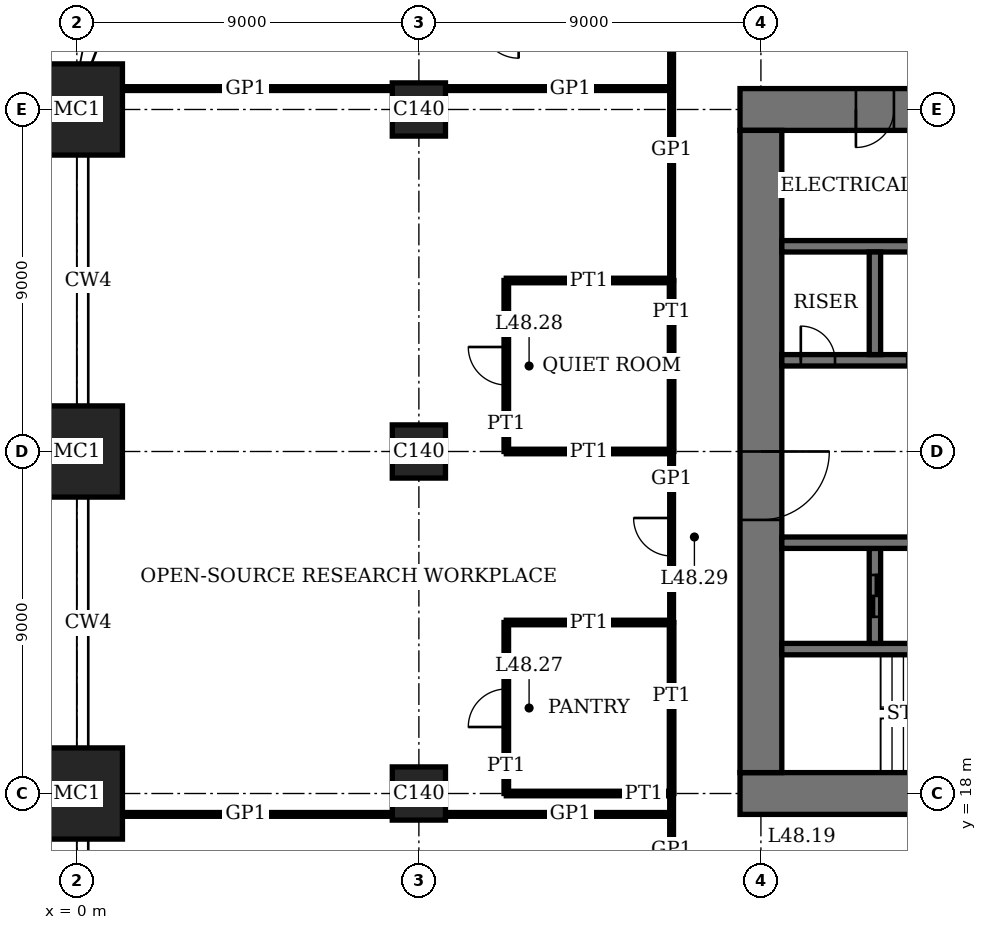
"""IFC4 building model, lengths in metres.
Left out: names, types, materials, properties, quantities, classifications, styles, units other than length and angle.
Written with IfcOpenShell. Run it as: python <this file> out.ifc"""

import sys

from ifc_helpers import new_model, si_unit, direction, frame, frame_2d, origin, origin_2d, place, context, subcontext, project, spatial, rectangle, extrude, element, fill, save


model = new_model("IFC4")
c1 = context("Model", 3, precision=1e-05, world=origin(), true_north=direction((0.0, 1.0)))
c2 = subcontext(c1, "Body", "Model", "MODEL_VIEW")
j1 = project(units=[si_unit("LENGTHUNIT", "METRE"), si_unit("PLANEANGLEUNIT", "RADIAN")], contexts=[c1])
p1 = place(None, origin())
s1 = spatial("IfcSite", under=j1, at=p1, CompositionType="ELEMENT")
p2 = place(p1, origin())
s2 = spatial("IfcBuilding", under=s1, at=p2, CompositionType="ELEMENT")
p3 = place(p2, frame((0.0, 0.0, 198.2)))
s3 = spatial("IfcBuildingStorey", under=s2, at=p3, CompositionType="ELEMENT", Elevation=198.2)
for number, where, z_axis, x_axis in (
    (1, (0.0, 18.0, 0.0), (0.0, 0.0, 1.0), (1.0, 0.0, 0.0)),
    (2, (0.0, 27.0, 0.0), (0.0, 0.0, 1.0), (1.0, 0.0, 0.0)),
    (3, (0.0, 36.0, 0.0), (0.0, 0.0, 1.0), (1.0, 0.0, 0.0)),
):
    element("IfcColumn", number, at=place(p3, frame(where, z_axis=z_axis, x_axis=x_axis)), inside=s3, PredefinedType="COLUMN", context=c2, shape_type="SweptSolid", body=[
        extrude(rectangle(XDim=2.4, YDim=2.4, at=origin_2d()), origin(), (0.0, 0.0, 1.0), 4.0),
    ])
for number, where, z_axis, x_axis in (
    (4, (9.0, 18.0, 0.0), (0.0, 0.0, 1.0), (1.0, 0.0, 0.0)),
    (5, (9.0, 27.0, 0.0), (0.0, 0.0, 1.0), (1.0, 0.0, 0.0)),
    (6, (9.0, 36.0, 0.0), (0.0, 0.0, 1.0), (1.0, 0.0, 0.0)),
):
    element("IfcColumn", number, at=place(p3, frame(where, z_axis=z_axis, x_axis=x_axis)), inside=s3, PredefinedType="COLUMN", context=c2, shape_type="SweptSolid", body=[
        extrude(rectangle(XDim=1.4, YDim=1.4, at=origin_2d()), origin(), (0.0, 0.0, 1.0), 4.0),
    ])
p4 = place(p3, frame((17.45, 18.0, 0.0), z_axis=(0.0, 0.0, 1.0), x_axis=(1.0, 0.0, 0.0)))
e7 = element("IfcWall", 7, at=p4, inside=s3, PredefinedType="SHEAR", context=c2, shape_type="SweptSolid", body=[
    extrude(rectangle(XDim=28.1, YDim=1.1, at=frame_2d((14.05, 0.0))), origin(), (0.0, 0.0, 1.0), 4.0),
])
p5 = place(p4, frame((11.55, 0.0, 0.0)))
e8 = element("IfcOpeningElement", 8, at=p5, cuts=e7, PredefinedType="OPENING", context=c2, shape_type="SweptSolid", body=[
    extrude(rectangle(XDim=1.0, YDim=2.4, at=frame_2d((0.5, 1.2))), frame((0.0, 0.56, 0.0), z_axis=(0.0, -1.0, 0.0), x_axis=(1.0, 0.0, 0.0)), (0.0, 0.0, 1.0), 1.12),
])
p6 = place(p4, frame((16.55, 0.0, 0.0)))
e9 = element("IfcOpeningElement", 9, at=p6, cuts=e7, PredefinedType="OPENING", context=c2, shape_type="SweptSolid", body=[
    extrude(rectangle(XDim=1.0, YDim=2.4, at=frame_2d((0.5, 1.2))), frame((0.0, 0.56, 0.0), z_axis=(0.0, -1.0, 0.0), x_axis=(1.0, 0.0, 0.0)), (0.0, 0.0, 1.0), 1.12),
])
p7 = place(p4, frame((20.0, 0.0, 0.0)))
e10 = element("IfcOpeningElement", 10, at=p7, cuts=e7, PredefinedType="OPENING", context=c2, shape_type="SweptSolid", body=[
    extrude(rectangle(XDim=1.1, YDim=2.4, at=frame_2d((0.55, 1.2))), frame((0.0, 0.56, 0.0), z_axis=(0.0, -1.0, 0.0), x_axis=(1.0, 0.0, 0.0)), (0.0, 0.0, 1.0), 1.12),
])
p8 = place(p4, frame((24.05, 0.0, 0.0)))
e11 = element("IfcOpeningElement", 11, at=p8, cuts=e7, PredefinedType="OPENING", context=c2, shape_type="SweptSolid", body=[
    extrude(rectangle(XDim=1.0, YDim=2.4, at=frame_2d((0.5, 1.2))), frame((0.0, 0.56, 0.0), z_axis=(0.0, -1.0, 0.0), x_axis=(1.0, 0.0, 0.0)), (0.0, 0.0, 1.0), 1.12),
])
p9 = place(p3, frame((45.55, 36.0, 0.0), z_axis=(0.0, 0.0, 1.0), x_axis=(-1.0, 0.0, 0.0)))
e12 = element("IfcWall", 12, at=p9, inside=s3, PredefinedType="SHEAR", context=c2, shape_type="SweptSolid", body=[
    extrude(rectangle(XDim=28.1, YDim=1.1, at=frame_2d((14.05, 0.0))), origin(), (0.0, 0.0, 1.0), 4.0),
])
p10 = place(p9, frame((11.55, 0.0, 0.0)))
e13 = element("IfcOpeningElement", 13, at=p10, cuts=e12, PredefinedType="OPENING", context=c2, shape_type="SweptSolid", body=[
    extrude(rectangle(XDim=1.0, YDim=2.4, at=frame_2d((0.5, 1.2))), frame((0.0, 0.56, 0.0), z_axis=(0.0, -1.0, 0.0), x_axis=(1.0, 0.0, 0.0)), (0.0, 0.0, 1.0), 1.12),
])
p11 = place(p9, frame((16.55, 0.0, 0.0)))
e14 = element("IfcOpeningElement", 14, at=p11, cuts=e12, PredefinedType="OPENING", context=c2, shape_type="SweptSolid", body=[
    extrude(rectangle(XDim=1.0, YDim=2.4, at=frame_2d((0.5, 1.2))), frame((0.0, 0.56, 0.0), z_axis=(0.0, -1.0, 0.0), x_axis=(1.0, 0.0, 0.0)), (0.0, 0.0, 1.0), 1.12),
])
p12 = place(p9, frame((20.0, 0.0, 0.0)))
e15 = element("IfcOpeningElement", 15, at=p12, cuts=e12, PredefinedType="OPENING", context=c2, shape_type="SweptSolid", body=[
    extrude(rectangle(XDim=1.1, YDim=2.4, at=frame_2d((0.55, 1.2))), frame((0.0, 0.56, 0.0), z_axis=(0.0, -1.0, 0.0), x_axis=(1.0, 0.0, 0.0)), (0.0, 0.0, 1.0), 1.12),
])
p13 = place(p9, frame((24.05, 0.0, 0.0)))
e16 = element("IfcOpeningElement", 16, at=p13, cuts=e12, PredefinedType="OPENING", context=c2, shape_type="SweptSolid", body=[
    extrude(rectangle(XDim=1.0, YDim=2.4, at=frame_2d((0.5, 1.2))), frame((0.0, 0.56, 0.0), z_axis=(0.0, -1.0, 0.0), x_axis=(1.0, 0.0, 0.0)), (0.0, 0.0, 1.0), 1.12),
])
p14 = place(p3, frame((18.0, 35.45, 0.0), z_axis=(0.0, 0.0, 1.0), x_axis=(0.0, -1.0, 0.0)))
e17 = element("IfcWall", 17, at=p14, inside=s3, PredefinedType="SHEAR", context=c2, shape_type="SweptSolid", body=[
    extrude(rectangle(XDim=16.9, YDim=1.1, at=frame_2d((8.45, 0.0))), origin(), (0.0, 0.0, 1.0), 4.0),
])
p15 = place(p14, frame((8.45, 0.0, 0.0)))
e18 = element("IfcOpeningElement", 18, at=p15, cuts=e17, PredefinedType="OPENING", context=c2, shape_type="SweptSolid", body=[
    extrude(rectangle(XDim=1.8, YDim=2.4, at=frame_2d((0.9, 1.2))), frame((0.0, 0.56, 0.0), z_axis=(0.0, -1.0, 0.0), x_axis=(1.0, 0.0, 0.0)), (0.0, 0.0, 1.0), 1.12),
])
p16 = place(p3, frame((18.55, 21.8, 0.0), z_axis=(0.0, 0.0, 1.0), x_axis=(1.0, 0.0, 0.0)))
e19 = element("IfcWall", 19, at=p16, inside=s3, PredefinedType="SHEAR", context=c2, shape_type="SweptSolid", body=[
    extrude(rectangle(XDim=8.3, YDim=0.3, at=frame_2d((4.15, 0.0))), origin(), (0.0, 0.0, 1.0), 4.0),
])
p17 = place(p16, frame((6.85, 0.0, 0.0)))
e20 = element("IfcOpeningElement", 20, at=p17, cuts=e19, PredefinedType="OPENING", context=c2, shape_type="SweptSolid", body=[
    extrude(rectangle(XDim=1.0, YDim=2.4, at=frame_2d((0.5, 1.2))), frame((0.0, 0.16, 0.0), z_axis=(0.0, -1.0, 0.0), x_axis=(1.0, 0.0, 0.0)), (0.0, 0.0, 1.0), 0.32),
])
p18 = place(p3, frame((21.0, 21.95, 0.0), z_axis=(0.0, 0.0, 1.0), x_axis=(0.0, 1.0, 0.0)))
e21 = element("IfcWall", 21, at=p18, inside=s3, PredefinedType="SHEAR", context=c2, shape_type="SweptSolid", body=[
    extrude(rectangle(XDim=2.5, YDim=0.3, at=frame_2d((1.25, 0.0))), origin(), (0.0, 0.0, 1.0), 4.0),
])
p19 = place(p18, frame((0.7, 0.0, 0.0)))
e22 = element("IfcOpeningElement", 22, at=p19, cuts=e21, PredefinedType="OPENING", context=c2, shape_type="SweptSolid", body=[
    extrude(rectangle(XDim=1.1, YDim=2.4, at=frame_2d((0.55, 1.2))), frame((0.0, 0.16, 0.0), z_axis=(0.0, -1.0, 0.0), x_axis=(1.0, 0.0, 0.0)), (0.0, 0.0, 1.0), 0.32),
])
p20 = place(p3, frame((18.55, 24.6, 0.0), z_axis=(0.0, 0.0, 1.0), x_axis=(1.0, 0.0, 0.0)))
e23 = element("IfcWall", 23, at=p20, inside=s3, PredefinedType="SHEAR", context=c2, shape_type="SweptSolid", body=[
    extrude(rectangle(XDim=25.9, YDim=0.3, at=frame_2d((12.95, 0.0))), origin(), (0.0, 0.0, 1.0), 4.0),
])
p21 = place(p20, frame((4.95, 0.0, 0.0)))
e24 = element("IfcOpeningElement", 24, at=p21, cuts=e23, PredefinedType="OPENING", context=c2, shape_type="SweptSolid", body=[
    extrude(rectangle(XDim=1.0, YDim=2.4, at=frame_2d((0.5, 1.2))), frame((0.0, 0.16, 0.0), z_axis=(0.0, -1.0, 0.0), x_axis=(1.0, 0.0, 0.0)), (0.0, 0.0, 1.0), 0.32),
])
p22 = place(p20, frame((24.5, 0.0, 0.0)))
e25 = element("IfcOpeningElement", 25, at=p22, cuts=e23, PredefinedType="OPENING", context=c2, shape_type="SweptSolid", body=[
    extrude(rectangle(XDim=0.9, YDim=2.1, at=frame_2d((0.45, 1.05))), frame((0.0, 0.16, 0.0), z_axis=(0.0, -1.0, 0.0), x_axis=(1.0, 0.0, 0.0)), (0.0, 0.0, 1.0), 0.32),
])
p23 = place(p20, frame((21.3, 0.0, 0.0)))
e26 = element("IfcOpeningElement", 26, at=p23, cuts=e23, PredefinedType="OPENING", context=c2, shape_type="SweptSolid", body=[
    extrude(rectangle(XDim=1.3, YDim=2.4, at=frame_2d((0.65, 1.2))), frame((0.0, 0.16, 0.0), z_axis=(0.0, -1.0, 0.0), x_axis=(1.0, 0.0, 0.0)), (0.0, 0.0, 1.0), 0.32),
])
p24 = place(p3, frame((18.55, 29.4, 0.0), z_axis=(0.0, 0.0, 1.0), x_axis=(1.0, 0.0, 0.0)))
e27 = element("IfcWall", 27, at=p24, inside=s3, PredefinedType="SHEAR", context=c2, shape_type="SweptSolid", body=[
    extrude(rectangle(XDim=25.9, YDim=0.3, at=frame_2d((12.95, 0.0))), origin(), (0.0, 0.0, 1.0), 4.0),
])
p25 = place(p24, frame((19.95, 0.0, 0.0)))
e28 = element("IfcOpeningElement", 28, at=p25, cuts=e27, PredefinedType="OPENING", context=c2, shape_type="SweptSolid", body=[
    extrude(rectangle(XDim=1.0, YDim=2.4, at=frame_2d((0.5, 1.2))), frame((0.0, 0.16, 0.0), z_axis=(0.0, -1.0, 0.0), x_axis=(1.0, 0.0, 0.0)), (0.0, 0.0, 1.0), 0.32),
])
p26 = place(p24, frame((0.5, 0.0, 0.0)))
e29 = element("IfcOpeningElement", 29, at=p26, cuts=e27, PredefinedType="OPENING", context=c2, shape_type="SweptSolid", body=[
    extrude(rectangle(XDim=0.9, YDim=2.1, at=frame_2d((0.45, 1.05))), frame((0.0, 0.16, 0.0), z_axis=(0.0, -1.0, 0.0), x_axis=(1.0, 0.0, 0.0)), (0.0, 0.0, 1.0), 0.32),
])
p27 = place(p24, frame((15.45, 0.0, 0.0)))
e30 = element("IfcOpeningElement", 30, at=p27, cuts=e27, PredefinedType="OPENING", context=c2, shape_type="SweptSolid", body=[
    extrude(rectangle(XDim=1.0, YDim=2.4, at=frame_2d((0.5, 1.2))), frame((0.0, 0.16, 0.0), z_axis=(0.0, -1.0, 0.0), x_axis=(1.0, 0.0, 0.0)), (0.0, 0.0, 1.0), 0.32),
])
p28 = place(p24, frame((12.45, 0.0, 0.0)))
e31 = element("IfcOpeningElement", 31, at=p28, cuts=e27, PredefinedType="OPENING", context=c2, shape_type="SweptSolid", body=[
    extrude(rectangle(XDim=1.0, YDim=2.4, at=frame_2d((0.5, 1.2))), frame((0.0, 0.16, 0.0), z_axis=(0.0, -1.0, 0.0), x_axis=(1.0, 0.0, 0.0)), (0.0, 0.0, 1.0), 0.32),
])
p29 = place(p24, frame((9.4, 0.0, 0.0)))
e32 = element("IfcOpeningElement", 32, at=p29, cuts=e27, PredefinedType="OPENING", context=c2, shape_type="SweptSolid", body=[
    extrude(rectangle(XDim=1.1, YDim=2.4, at=frame_2d((0.55, 1.2))), frame((0.0, 0.16, 0.0), z_axis=(0.0, -1.0, 0.0), x_axis=(1.0, 0.0, 0.0)), (0.0, 0.0, 1.0), 0.32),
])
p30 = place(p24, frame((6.4, 0.0, 0.0)))
e33 = element("IfcOpeningElement", 33, at=p30, cuts=e27, PredefinedType="OPENING", context=c2, shape_type="SweptSolid", body=[
    extrude(rectangle(XDim=1.1, YDim=2.4, at=frame_2d((0.55, 1.2))), frame((0.0, 0.16, 0.0), z_axis=(0.0, -1.0, 0.0), x_axis=(1.0, 0.0, 0.0)), (0.0, 0.0, 1.0), 0.32),
])
p31 = place(p24, frame((3.3, 0.0, 0.0)))
e34 = element("IfcOpeningElement", 34, at=p31, cuts=e27, PredefinedType="OPENING", context=c2, shape_type="SweptSolid", body=[
    extrude(rectangle(XDim=1.3, YDim=2.4, at=frame_2d((0.65, 1.2))), frame((0.0, 0.16, 0.0), z_axis=(0.0, -1.0, 0.0), x_axis=(1.0, 0.0, 0.0)), (0.0, 0.0, 1.0), 0.32),
])
p32 = place(p3, frame((18.55, 32.4, 0.0), z_axis=(0.0, 0.0, 1.0), x_axis=(1.0, 0.0, 0.0)))
e35 = element("IfcWall", 35, at=p32, inside=s3, PredefinedType="SHEAR", context=c2, shape_type="SweptSolid", body=[
    extrude(rectangle(XDim=17.3, YDim=0.3, at=frame_2d((8.65, 0.0))), origin(), (0.0, 0.0, 1.0), 4.0),
])
p33 = place(p3, frame((21.0, 29.55, 0.0), z_axis=(0.0, 0.0, 1.0), x_axis=(0.0, 1.0, 0.0)))
e36 = element("IfcWall", 36, at=p33, inside=s3, PredefinedType="SHEAR", context=c2, shape_type="SweptSolid", body=[
    extrude(rectangle(XDim=2.7, YDim=0.3, at=frame_2d((1.35, 0.0))), origin(), (0.0, 0.0, 1.0), 4.0),
])
p34 = place(p3, frame((1.2, 17.45, 0.0), z_axis=(0.0, 0.0, 1.0), x_axis=(1.0, 0.0, 0.0)))
e37 = element("IfcWall", 37, at=p34, inside=s3, PredefinedType="PARTITIONING", context=c2, shape_type="SweptSolid", body=[
    extrude(rectangle(XDim=7.1, YDim=0.1, at=frame_2d((3.55, 0.0))), origin(), (0.0, 0.0, 1.0), 3.75),
])
p35 = place(p3, frame((9.7, 17.45, 0.0), z_axis=(0.0, 0.0, 1.0), x_axis=(1.0, 0.0, 0.0)))
e38 = element("IfcWall", 38, at=p35, inside=s3, PredefinedType="PARTITIONING", context=c2, shape_type="SweptSolid", body=[
    extrude(rectangle(XDim=5.95, YDim=0.1, at=frame_2d((2.975, 0.0))), origin(), (0.0, 0.0, 1.0), 3.75),
])
p36 = place(p3, frame((11.3, 18.0, 0.0), z_axis=(0.0, 0.0, 1.0), x_axis=(1.0, 0.0, 0.0)))
e39 = element("IfcWall", 39, at=p36, inside=s3, PredefinedType="PARTITIONING", context=c2, shape_type="SweptSolid", body=[
    extrude(rectangle(XDim=4.35, YDim=0.12, at=frame_2d((2.175, 0.0))), origin(), (0.0, 0.0, 1.0), 3.05),
])
p37 = place(p3, frame((11.3, 22.5, 0.0), z_axis=(0.0, 0.0, 1.0), x_axis=(1.0, 0.0, 0.0)))
e40 = element("IfcWall", 40, at=p37, inside=s3, PredefinedType="PARTITIONING", context=c2, shape_type="SweptSolid", body=[
    extrude(rectangle(XDim=4.35, YDim=0.12, at=frame_2d((2.175, 0.0))), origin(), (0.0, 0.0, 1.0), 3.1),
])
p38 = place(p3, frame((11.3, 27.0, 0.0), z_axis=(0.0, 0.0, 1.0), x_axis=(1.0, 0.0, 0.0)))
e41 = element("IfcWall", 41, at=p38, inside=s3, PredefinedType="PARTITIONING", context=c2, shape_type="SweptSolid", body=[
    extrude(rectangle(XDim=4.35, YDim=0.12, at=frame_2d((2.175, 0.0))), origin(), (0.0, 0.0, 1.0), 3.05),
])
p39 = place(p3, frame((11.3, 31.5, 0.0), z_axis=(0.0, 0.0, 1.0), x_axis=(1.0, 0.0, 0.0)))
e42 = element("IfcWall", 42, at=p39, inside=s3, PredefinedType="PARTITIONING", context=c2, shape_type="SweptSolid", body=[
    extrude(rectangle(XDim=4.35, YDim=0.12, at=frame_2d((2.175, 0.0))), origin(), (0.0, 0.0, 1.0), 3.1),
])
p40 = place(p3, frame((1.2, 36.55, 0.0), z_axis=(0.0, 0.0, 1.0), x_axis=(1.0, 0.0, 0.0)))
e43 = element("IfcWall", 43, at=p40, inside=s3, PredefinedType="PARTITIONING", context=c2, shape_type="SweptSolid", body=[
    extrude(rectangle(XDim=7.1, YDim=0.1, at=frame_2d((3.55, 0.0))), origin(), (0.0, 0.0, 1.0), 3.75),
])
p41 = place(p3, frame((9.7, 36.55, 0.0), z_axis=(0.0, 0.0, 1.0), x_axis=(1.0, 0.0, 0.0)))
e44 = element("IfcWall", 44, at=p41, inside=s3, PredefinedType="PARTITIONING", context=c2, shape_type="SweptSolid", body=[
    extrude(rectangle(XDim=5.95, YDim=0.1, at=frame_2d((2.975, 0.0))), origin(), (0.0, 0.0, 1.0), 3.75),
])
p42 = place(p3, frame((11.3, 18.0, 0.0), z_axis=(0.0, 0.0, 1.0), x_axis=(0.0, 1.0, 0.0)))
e45 = element("IfcWall", 45, at=p42, inside=s3, PredefinedType="PARTITIONING", context=c2, shape_type="SweptSolid", body=[
    extrude(rectangle(XDim=4.5, YDim=0.12, at=frame_2d((2.25, 0.0))), origin(), (0.0, 0.0, 1.0), 3.75),
])
p43 = place(p42, frame((1.75, 0.0, 0.0)))
e46 = element("IfcOpeningElement", 46, at=p43, cuts=e45, PredefinedType="OPENING", context=c2, shape_type="SweptSolid", body=[
    extrude(rectangle(XDim=1.0, YDim=2.4, at=frame_2d((0.5, 1.2))), frame((0.0, 0.07, 0.0), z_axis=(0.0, -1.0, 0.0), x_axis=(1.0, 0.0, 0.0)), (0.0, 0.0, 1.0), 0.14),
])
p44 = place(p3, frame((11.3, 27.0, 0.0), z_axis=(0.0, 0.0, 1.0), x_axis=(0.0, 1.0, 0.0)))
e47 = element("IfcWall", 47, at=p44, inside=s3, PredefinedType="PARTITIONING", context=c2, shape_type="SweptSolid", body=[
    extrude(rectangle(XDim=4.5, YDim=0.12, at=frame_2d((2.25, 0.0))), origin(), (0.0, 0.0, 1.0), 3.75),
])
p45 = place(p44, frame((1.75, 0.0, 0.0)))
e48 = element("IfcOpeningElement", 48, at=p45, cuts=e47, PredefinedType="OPENING", context=c2, shape_type="SweptSolid", body=[
    extrude(rectangle(XDim=1.0, YDim=2.4, at=frame_2d((0.5, 1.2))), frame((0.0, 0.07, 0.0), z_axis=(0.0, -1.0, 0.0), x_axis=(1.0, 0.0, 0.0)), (0.0, 0.0, 1.0), 0.14),
])
for number, where, z_axis, x_axis in (
    (49, (15.65, 18.0, 0.0), (0.0, 0.0, 1.0), (0.0, 1.0, 0.0)),
    (50, (15.65, 27.0, 0.0), (0.0, 0.0, 1.0), (0.0, 1.0, 0.0)),
):
    element("IfcWall", number, at=place(p3, frame(where, z_axis=z_axis, x_axis=x_axis)), inside=s3, PredefinedType="PARTITIONING", context=c2, shape_type="SweptSolid", body=[
        extrude(rectangle(XDim=4.5, YDim=0.12, at=frame_2d((2.25, 0.0))), origin(), (0.0, 0.0, 1.0), 3.75),
    ])
p46 = place(p3, frame((15.65, 15.65, 0.0), z_axis=(0.0, 0.0, 1.0), x_axis=(0.0, 1.0, 0.0)))
e51 = element("IfcWall", 51, at=p46, inside=s3, PredefinedType="PARTITIONING", context=c2, shape_type="SweptSolid", body=[
    extrude(rectangle(XDim=2.35, YDim=0.1, at=frame_2d((1.175, 0.0))), origin(), (0.0, 0.0, 1.0), 3.75),
])
p47 = place(p3, frame((15.65, 22.5, 0.0), z_axis=(0.0, 0.0, 1.0), x_axis=(0.0, 1.0, 0.0)))
e52 = element("IfcWall", 52, at=p47, inside=s3, PredefinedType="PARTITIONING", context=c2, shape_type="SweptSolid", body=[
    extrude(rectangle(XDim=4.5, YDim=0.1, at=frame_2d((2.25, 0.0))), origin(), (0.0, 0.0, 1.0), 3.75),
])
p48 = place(p47, frame((1.75, 0.0, 0.0)))
e53 = element("IfcOpeningElement", 53, at=p48, cuts=e52, PredefinedType="OPENING", context=c2, shape_type="SweptSolid", body=[
    extrude(rectangle(XDim=1.0, YDim=2.4, at=frame_2d((0.5, 1.2))), frame((0.0, 0.06, 0.0), z_axis=(0.0, -1.0, 0.0), x_axis=(1.0, 0.0, 0.0)), (0.0, 0.0, 1.0), 0.12),
])
p49 = place(p3, frame((15.65, 31.5, 0.0), z_axis=(0.0, 0.0, 1.0), x_axis=(0.0, 1.0, 0.0)))
e54 = element("IfcWall", 54, at=p49, inside=s3, PredefinedType="PARTITIONING", context=c2, shape_type="SweptSolid", body=[
    extrude(rectangle(XDim=6.85, YDim=0.1, at=frame_2d((3.425, 0.0))), origin(), (0.0, 0.0, 1.0), 3.75),
])
p50 = place(p15, origin())
e55 = element("IfcDoor", 55, at=p50, inside=s3, OperationType="DOUBLE_DOOR_DOUBLE_SWING", PredefinedType="DOOR", context=c2, shape_type="SweptSolid", body=[
    extrude(rectangle(XDim=1.8, YDim=2.4, at=frame_2d((0.9, 1.2))), frame((0.0, 0.03, 0.0), z_axis=(0.0, -1.0, 0.0), x_axis=(1.0, 0.0, 0.0)), (0.0, 0.0, 1.0), 0.06),
    extrude(rectangle(XDim=0.04, YDim=2.4, at=frame_2d((0.02, 1.2))), frame((0.0, 0.55, 0.0), z_axis=(0.0, -1.0, 0.0), x_axis=(1.0, 0.0, 0.0)), (0.0, 0.0, 1.0), 1.1),
    extrude(rectangle(XDim=0.04, YDim=2.4, at=frame_2d((1.78, 1.2))), frame((0.0, 0.55, 0.0), z_axis=(0.0, -1.0, 0.0), x_axis=(1.0, 0.0, 0.0)), (0.0, 0.0, 1.0), 1.1),
    extrude(rectangle(XDim=1.8, YDim=0.04, at=frame_2d((0.9, 2.38))), frame((0.0, 0.55, 0.0), z_axis=(0.0, -1.0, 0.0), x_axis=(1.0, 0.0, 0.0)), (0.0, 0.0, 1.0), 1.1),
])
fill(e18, e55)
p51 = place(p13, origin())
e56 = element("IfcDoor", 56, at=p51, inside=s3, OperationType="SINGLE_SWING_LEFT", PredefinedType="DOOR", context=c2, shape_type="SweptSolid", body=[
    extrude(rectangle(XDim=1.0, YDim=2.4, at=frame_2d((0.5, 1.2))), frame((0.0, 0.025, 0.0), z_axis=(0.0, -1.0, 0.0), x_axis=(1.0, 0.0, 0.0)), (0.0, 0.0, 1.0), 0.05),
    extrude(rectangle(XDim=0.04, YDim=2.4, at=frame_2d((0.02, 1.2))), frame((0.0, 0.4, 0.0), z_axis=(0.0, -1.0, 0.0), x_axis=(1.0, 0.0, 0.0)), (0.0, 0.0, 1.0), 0.8),
    extrude(rectangle(XDim=0.04, YDim=2.4, at=frame_2d((0.98, 1.2))), frame((0.0, 0.4, 0.0), z_axis=(0.0, -1.0, 0.0), x_axis=(1.0, 0.0, 0.0)), (0.0, 0.0, 1.0), 0.8),
    extrude(rectangle(XDim=1.0, YDim=0.04, at=frame_2d((0.5, 2.38))), frame((0.0, 0.4, 0.0), z_axis=(0.0, -1.0, 0.0), x_axis=(1.0, 0.0, 0.0)), (0.0, 0.0, 1.0), 0.8),
])
fill(e16, e56)
p52 = place(p26, origin())
e57 = element("IfcDoor", 57, at=p52, inside=s3, OperationType="SINGLE_SWING_RIGHT", PredefinedType="DOOR", context=c2, shape_type="SweptSolid", body=[
    extrude(rectangle(XDim=0.9, YDim=2.1, at=frame_2d((0.45, 1.05))), frame((0.0, 0.03, 0.0), z_axis=(0.0, -1.0, 0.0), x_axis=(1.0, 0.0, 0.0)), (0.0, 0.0, 1.0), 0.06),
])
fill(e29, e57)
p53 = place(p43, origin())
e58 = element("IfcDoor", 58, at=p53, inside=s3, OperationType="SINGLE_SWING_RIGHT", PredefinedType="DOOR", context=c2, shape_type="SweptSolid", body=[
    extrude(rectangle(XDim=1.0, YDim=2.4, at=frame_2d((0.5, 1.2))), frame((0.0, 0.025, 0.0), z_axis=(0.0, -1.0, 0.0), x_axis=(1.0, 0.0, 0.0)), (0.0, 0.0, 1.0), 0.05),
])
fill(e46, e58)
p54 = place(p45, origin())
e59 = element("IfcDoor", 59, at=p54, inside=s3, OperationType="SINGLE_SWING_LEFT", PredefinedType="DOOR", context=c2, shape_type="SweptSolid", body=[
    extrude(rectangle(XDim=1.0, YDim=2.4, at=frame_2d((0.5, 1.2))), frame((0.0, 0.025, 0.0), z_axis=(0.0, -1.0, 0.0), x_axis=(1.0, 0.0, 0.0)), (0.0, 0.0, 1.0), 0.05),
])
fill(e48, e59)
p55 = place(p48, origin())
e60 = element("IfcDoor", 60, at=p55, inside=s3, OperationType="SINGLE_SWING_LEFT", PredefinedType="DOOR", context=c2, shape_type="SweptSolid", body=[
    extrude(rectangle(XDim=1.0, YDim=2.4, at=frame_2d((0.5, 1.2))), frame((0.0, 0.02, 0.0), z_axis=(0.0, -1.0, 0.0), x_axis=(1.0, 0.0, 0.0)), (0.0, 0.0, 1.0), 0.04),
])
fill(e53, e60)
p56 = place(p31, origin())
e61 = element("IfcDoor", 61, at=p56, inside=s3, OperationType="DOUBLE_DOOR_SLIDING", PredefinedType="DOOR", context=c2, shape_type="SweptSolid", body=[
    extrude(rectangle(XDim=1.3, YDim=2.4, at=frame_2d((0.65, 1.2))), frame((0.0, 0.02, 0.0), z_axis=(0.0, -1.0, 0.0), x_axis=(1.0, 0.0, 0.0)), (0.0, 0.0, 1.0), 0.04),
])
fill(e34, e61)
p57 = place(p19, origin())
e62 = element("IfcDoor", 62, at=p57, inside=s3, OperationType="DOUBLE_DOOR_SLIDING", PredefinedType="DOOR", context=c2, shape_type="SweptSolid", body=[
    extrude(rectangle(XDim=1.1, YDim=2.4, at=frame_2d((0.55, 1.2))), frame((0.0, 0.03, 0.0), z_axis=(0.0, -1.0, 0.0), x_axis=(1.0, 0.0, 0.0)), (0.0, 0.0, 1.0), 0.06),
])
fill(e22, e62)
save(model, sys.argv[1])
